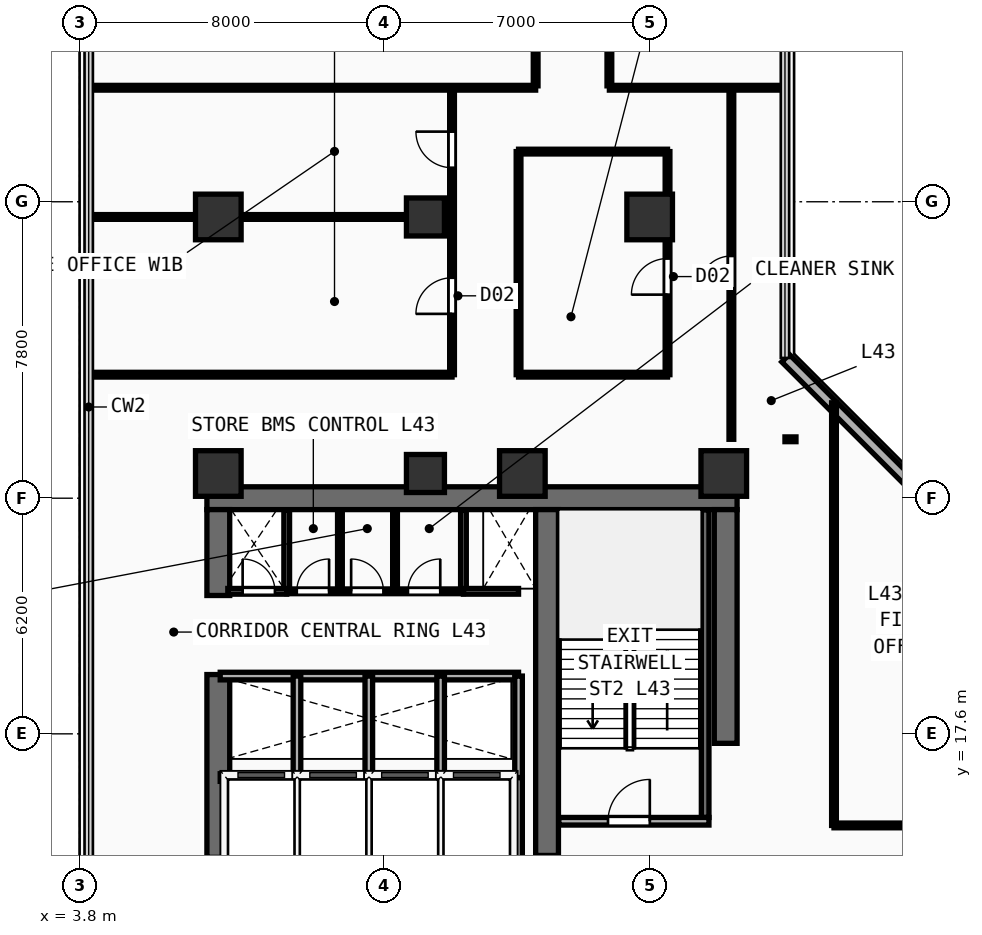
"""IFC4 building model, lengths in metres.
Left out: names, types, materials, properties, quantities, classifications, styles, units other than length and angle.
Written with IfcOpenShell. Run it as: python <this file> out.ifc"""

import sys

from ifc_helpers import new_model, si_unit, direction, frame, frame_2d, origin, origin_2d, place, context, subcontext, project, spatial, rectangle, extrude, element, fill, save


model = new_model("IFC4")
c1 = context("Model", 3, precision=1e-05, world=origin(), true_north=direction((0.0, 1.0)))
c2 = subcontext(c1, "Body", "Model", "MODEL_VIEW")
j1 = project(units=[si_unit("LENGTHUNIT", "METRE"), si_unit("PLANEANGLEUNIT", "RADIAN")], contexts=[c1])
p1 = place(None, origin())
s1 = spatial("IfcSite", under=j1, at=p1, CompositionType="ELEMENT")
p2 = place(p1, origin())
s2 = spatial("IfcBuilding", under=s1, at=p2, CompositionType="ELEMENT")
p3 = place(p2, frame((0.0, 0.0, 169.0)))
s3 = spatial("IfcBuildingStorey", under=s2, at=p3, CompositionType="ELEMENT", Elevation=169.0)
p4 = place(p3, frame((7.15, 23.8, 0.0), z_axis=(0.0, 0.0, 1.0), x_axis=(1.0, 0.0, 0.0)))
e1 = element("IfcWall", 1, at=p4, inside=s3, PredefinedType="SHEAR", context=c2, shape_type="SweptSolid", body=[
    extrude(rectangle(XDim=13.95, YDim=0.6, at=frame_2d((6.975, 0.0))), origin(), (0.0, 0.0, 1.0), 3.56),
])
p5 = place(p3, frame((7.45, 14.35, 0.0), z_axis=(0.0, 0.0, 1.0), x_axis=(0.0, 1.0, 0.0)))
e2 = element("IfcWall", 2, at=p5, inside=s3, PredefinedType="SHEAR", context=c2, shape_type="SweptSolid", body=[
    extrude(rectangle(XDim=4.81, YDim=0.6, at=frame_2d((2.405, 0.0))), origin(), (0.0, 0.0, 1.0), 3.56),
])
p6 = place(p3, frame((7.45, 21.24, 0.0), z_axis=(0.0, 0.0, 1.0), x_axis=(0.0, 1.0, 0.0)))
e3 = element("IfcWall", 3, at=p6, inside=s3, PredefinedType="SHEAR", context=c2, shape_type="SweptSolid", body=[
    extrude(rectangle(XDim=2.26, YDim=0.6, at=frame_2d((1.13, 0.0))), origin(), (0.0, 0.0, 1.0), 3.56),
])
p7 = place(p3, frame((20.8, 17.35, 0.0), z_axis=(0.0, 0.0, 1.0), x_axis=(0.0, 1.0, 0.0)))
e4 = element("IfcWall", 4, at=p7, inside=s3, PredefinedType="SHEAR", context=c2, shape_type="SweptSolid", body=[
    extrude(rectangle(XDim=6.15, YDim=0.6, at=frame_2d((3.075, 0.0))), origin(), (0.0, 0.0, 1.0), 3.56),
])
p8 = place(p3, frame((16.1, 14.4, 0.0), z_axis=(0.0, 0.0, 1.0), x_axis=(0.0, 1.0, 0.0)))
e5 = element("IfcWall", 5, at=p8, inside=s3, PredefinedType="SHEAR", context=c2, shape_type="SweptSolid", body=[
    extrude(rectangle(XDim=9.1, YDim=0.6, at=frame_2d((4.55, 0.0))), origin(), (0.0, 0.0, 1.0), 3.56),
])
for number, where, z_axis, x_axis in (
    (6, (7.45, 24.45, 0.0), (0.0, 0.0, 1.0), (1.0, 0.0, 0.0)),
    (7, (15.45, 24.45, 0.0), (0.0, 0.0, 1.0), (1.0, 0.0, 0.0)),
    (8, (20.75, 24.45, 0.0), (0.0, 0.0, 1.0), (1.0, 0.0, 0.0)),
    (9, (7.45, 31.2, 0.0), (0.0, 0.0, 1.0), (1.0, 0.0, 0.0)),
    (10, (18.8, 31.2, 0.0), (0.0, 0.0, 1.0), (1.0, 0.0, 0.0)),
):
    element("IfcColumn", number, at=place(p3, frame(where, z_axis=z_axis, x_axis=x_axis)), inside=s3, PredefinedType="COLUMN", context=c2, shape_type="SweptSolid", body=[
        extrude(rectangle(XDim=1.2, YDim=1.2, at=origin_2d()), origin(), (0.0, 0.0, 1.0), 3.56),
    ])
for number, where, z_axis, x_axis in (
    (11, (12.9, 24.45, 0.0), (0.0, 0.0, 1.0), (1.0, 0.0, 0.0)),
    (12, (12.9, 31.2, 0.0), (0.0, 0.0, 1.0), (1.0, 0.0, 0.0)),
):
    element("IfcColumn", number, at=place(p3, frame(where, z_axis=z_axis, x_axis=x_axis)), inside=s3, PredefinedType="COLUMN", context=c2, shape_type="SweptSolid", body=[
        extrude(rectangle(XDim=1.0, YDim=1.0, at=origin_2d()), origin(), (0.0, 0.0, 1.0), 3.56),
    ])
p9 = place(p3, frame((28.885, 20.975, 0.0), z_axis=(0.0, 0.0, 1.0), x_axis=(-0.707106781187, 0.707106781187, 0.0)))
e13 = element("IfcWall", 13, at=p9, inside=s3, PredefinedType="SOLIDWALL", context=c2, shape_type="SweptSolid", body=[
    extrude(rectangle(XDim=9.207, YDim=0.28, at=frame_2d((4.603, 0.0))), origin(), (0.0, 0.0, 1.0), 3.56),
])
p10 = place(p3, frame((20.26, 15.4, 0.0), z_axis=(0.0, 0.0, 1.0), x_axis=(0.0, 1.0, 0.0)))
e14 = element("IfcWall", 14, at=p10, inside=s3, PredefinedType="SHEAR", context=c2, shape_type="SweptSolid", body=[
    extrude(rectangle(XDim=8.09, YDim=0.2, at=frame_2d((4.045, 0.0))), origin(), (0.0, 0.0, 1.0), 3.56),
])
p11 = place(p3, frame((16.41, 15.3, 0.0), z_axis=(0.0, 0.0, 1.0), x_axis=(1.0, 0.0, 0.0)))
e15 = element("IfcWall", 15, at=p11, inside=s3, PredefinedType="PARTITIONING", context=c2, shape_type="SweptSolid", body=[
    extrude(rectangle(XDim=3.95, YDim=0.2, at=frame_2d((1.975, 0.0))), origin(), (0.0, 0.0, 1.0), 3.56),
])
p12 = place(p11, frame((1.294, 0.0, 0.0)))
e16 = element("IfcOpeningElement", 16, at=p12, cuts=e15, PredefinedType="OPENING", context=c2, shape_type="SweptSolid", body=[
    extrude(rectangle(XDim=1.1, YDim=2.2, at=frame_2d((0.55, 1.1))), frame((0.0, 0.11, 0.0), z_axis=(0.0, -1.0, 0.0), x_axis=(1.0, 0.0, 0.0)), (0.0, 0.0, 1.0), 0.22),
])
p13 = place(p3, frame((7.5, 16.45, 0.0), z_axis=(0.0, 0.0, 1.0), x_axis=(1.0, 0.0, 0.0)))
e17 = element("IfcWall", 17, at=p13, inside=s3, PredefinedType="PARTITIONING", context=c2, shape_type="SweptSolid", body=[
    extrude(rectangle(XDim=7.85, YDim=0.2, at=frame_2d((3.925, 0.0))), origin(), (0.0, 0.0, 1.0), 3.56),
])
for number, where, z_axis, x_axis in (
    (18, (15.35, 14.22, 0.0), (0.0, 0.0, 1.0), (0.0, 1.0, 0.0)),
    (19, (9.52, 14.22, 0.0), (0.0, 0.0, 1.0), (0.0, 1.0, 0.0)),
    (20, (11.41, 14.22, 0.0), (0.0, 0.0, 1.0), (0.0, 1.0, 0.0)),
    (21, (13.3, 14.22, 0.0), (0.0, 0.0, 1.0), (0.0, 1.0, 0.0)),
):
    element("IfcWall", number, at=place(p3, frame(where, z_axis=z_axis, x_axis=x_axis)), inside=s3, PredefinedType="PARTITIONING", context=c2, shape_type="SweptSolid", body=[
        extrude(rectangle(XDim=2.23, YDim=0.2, at=frame_2d((1.115, 0.0))), origin(), (0.0, 0.0, 1.0), 3.56),
    ])
p14 = place(p3, frame((7.5, 19.12, 0.0), z_axis=(0.0, 0.0, 1.0), x_axis=(1.0, 0.0, 0.0)))
e22 = element("IfcWall", 22, at=p14, inside=s3, PredefinedType="PARTITIONING", context=c2, shape_type="SweptSolid", body=[
    extrude(rectangle(XDim=7.85, YDim=0.2, at=frame_2d((3.925, 0.0))), origin(), (0.0, 0.0, 1.0), 3.56),
])
for number, where, z_axis, x_axis in (
    (23, (15.35, 16.45, 0.0), (0.0, 0.0, 1.0), (0.0, 1.0, 0.0)),
    (24, (9.52, 16.45, 0.0), (0.0, 0.0, 1.0), (0.0, 1.0, 0.0)),
    (25, (11.41, 16.45, 0.0), (0.0, 0.0, 1.0), (0.0, 1.0, 0.0)),
    (26, (13.3, 16.45, 0.0), (0.0, 0.0, 1.0), (0.0, 1.0, 0.0)),
):
    element("IfcWall", number, at=place(p3, frame(where, z_axis=z_axis, x_axis=x_axis)), inside=s3, PredefinedType="PARTITIONING", context=c2, shape_type="SweptSolid", body=[
        extrude(rectangle(XDim=2.67, YDim=0.2, at=frame_2d((1.335, 0.0))), origin(), (0.0, 0.0, 1.0), 3.56),
    ])
for number, where, z_axis, x_axis in (
    (27, (9.25, 21.35, 0.0), (0.0, 0.0, 1.0), (0.0, 1.0, 0.0)),
    (28, (13.9, 21.35, 0.0), (0.0, 0.0, 1.0), (0.0, 1.0, 0.0)),
):
    element("IfcWall", number, at=place(p3, frame(where, z_axis=z_axis, x_axis=x_axis)), inside=s3, PredefinedType="PARTITIONING", context=c2, shape_type="SweptSolid", body=[
        extrude(rectangle(XDim=2.13, YDim=0.15, at=frame_2d((1.065, 0.0))), origin(), (0.0, 0.0, 1.0), 3.56),
    ])
p15 = place(p3, frame((7.7, 21.35, 0.0), z_axis=(0.0, 0.0, 1.0), x_axis=(1.0, 0.0, 0.0)))
e29 = element("IfcWall", 29, at=p15, inside=s3, PredefinedType="PARTITIONING", context=c2, shape_type="SweptSolid", body=[
    extrude(rectangle(XDim=1.55, YDim=0.15, at=frame_2d((0.775, 0.0))), origin(), (0.0, 0.0, 1.0), 3.56),
])
p16 = place(p15, frame((0.39, 0.0, 0.0)))
e30 = element("IfcOpeningElement", 30, at=p16, cuts=e29, PredefinedType="OPENING", context=c2, shape_type="SweptSolid", body=[
    extrude(rectangle(XDim=0.85, YDim=2.15, at=frame_2d((0.425, 1.075))), frame((0.0, 0.085, 0.0), z_axis=(0.0, -1.0, 0.0), x_axis=(1.0, 0.0, 0.0)), (0.0, 0.0, 1.0), 0.17),
])
p17 = place(p3, frame((13.9, 21.35, 0.0), z_axis=(0.0, 0.0, 1.0), x_axis=(1.0, 0.0, 0.0)))
e31 = element("IfcWall", 31, at=p17, inside=s3, PredefinedType="PARTITIONING", context=c2, shape_type="SweptSolid", body=[
    extrude(rectangle(XDim=1.45, YDim=0.15, at=frame_2d((0.725, 0.0))), origin(), (0.0, 0.0, 1.0), 3.56),
])
p18 = place(p3, frame((9.25, 21.35, 0.0), z_axis=(0.0, 0.0, 1.0), x_axis=(1.0, 0.0, 0.0)))
e32 = element("IfcWall", 32, at=p18, inside=s3, PredefinedType="PARTITIONING", context=c2, shape_type="SweptSolid", body=[
    extrude(rectangle(XDim=4.65, YDim=0.125, at=frame_2d((2.325, 0.0))), origin(), (0.0, 0.0, 1.0), 3.56),
])
p19 = place(p18, frame((0.265, 0.0, 0.0)))
e33 = element("IfcOpeningElement", 33, at=p19, cuts=e32, PredefinedType="OPENING", context=c2, shape_type="SweptSolid", body=[
    extrude(rectangle(XDim=0.85, YDim=2.15, at=frame_2d((0.425, 1.075))), frame((0.0, 0.073, 0.0), z_axis=(0.0, -1.0, 0.0), x_axis=(1.0, 0.0, 0.0)), (0.0, 0.0, 1.0), 0.145),
])
p20 = place(p18, frame((1.695, 0.0, 0.0)))
e34 = element("IfcOpeningElement", 34, at=p20, cuts=e32, PredefinedType="OPENING", context=c2, shape_type="SweptSolid", body=[
    extrude(rectangle(XDim=0.85, YDim=2.15, at=frame_2d((0.425, 1.075))), frame((0.0, 0.073, 0.0), z_axis=(0.0, -1.0, 0.0), x_axis=(1.0, 0.0, 0.0)), (0.0, 0.0, 1.0), 0.145),
])
p21 = place(p18, frame((3.19, 0.0, 0.0)))
e35 = element("IfcOpeningElement", 35, at=p21, cuts=e32, PredefinedType="OPENING", context=c2, shape_type="SweptSolid", body=[
    extrude(rectangle(XDim=0.85, YDim=2.15, at=frame_2d((0.425, 1.075))), frame((0.0, 0.073, 0.0), z_axis=(0.0, -1.0, 0.0), x_axis=(1.0, 0.0, 0.0)), (0.0, 0.0, 1.0), 0.145),
])
for number, where, z_axis, x_axis in (
    (36, (10.65, 21.35, 0.0), (0.0, 0.0, 1.0), (0.0, 1.0, 0.0)),
    (37, (12.1, 21.35, 0.0), (0.0, 0.0, 1.0), (0.0, 1.0, 0.0)),
):
    element("IfcWall", number, at=place(p3, frame(where, z_axis=z_axis, x_axis=x_axis)), inside=s3, PredefinedType="PARTITIONING", context=c2, shape_type="SweptSolid", body=[
        extrude(rectangle(XDim=2.1, YDim=0.125, at=frame_2d((1.05, 0.0))), origin(), (0.0, 0.0, 1.0), 3.56),
    ])
for number, where, z_axis, x_axis in (
    (38, (15.35, 27.05, 0.0), (0.0, 0.0, 1.0), (1.0, 0.0, 0.0)),
    (39, (15.35, 32.92, 0.0), (0.0, 0.0, 1.0), (1.0, 0.0, 0.0)),
):
    element("IfcWall", number, at=place(p3, frame(where, z_axis=z_axis, x_axis=x_axis)), inside=s3, PredefinedType="PARTITIONING", context=c2, shape_type="SweptSolid", body=[
        extrude(rectangle(XDim=3.92, YDim=0.125, at=frame_2d((1.96, 0.0))), origin(), (0.0, 0.0, 1.0), 3.56),
    ])
p22 = place(p3, frame((15.35, 27.05, 0.0), z_axis=(0.0, 0.0, 1.0), x_axis=(0.0, 1.0, 0.0)))
e40 = element("IfcWall", 40, at=p22, inside=s3, PredefinedType="PARTITIONING", context=c2, shape_type="SweptSolid", body=[
    extrude(rectangle(XDim=5.87, YDim=0.125, at=frame_2d((2.935, 0.0))), origin(), (0.0, 0.0, 1.0), 3.56),
])
p23 = place(p3, frame((19.27, 27.05, 0.0), z_axis=(0.0, 0.0, 1.0), x_axis=(0.0, 1.0, 0.0)))
e41 = element("IfcWall", 41, at=p23, inside=s3, PredefinedType="PARTITIONING", context=c2, shape_type="SweptSolid", body=[
    extrude(rectangle(XDim=5.87, YDim=0.125, at=frame_2d((2.935, 0.0))), origin(), (0.0, 0.0, 1.0), 3.56),
])
p24 = place(p23, frame((2.106, 0.0, 0.0)))
e42 = element("IfcOpeningElement", 42, at=p24, cuts=e41, PredefinedType="OPENING", context=c2, shape_type="SweptSolid", body=[
    extrude(rectangle(XDim=0.95, YDim=2.15, at=frame_2d((0.475, 1.075))), frame((0.0, 0.073, 0.0), z_axis=(0.0, -1.0, 0.0), x_axis=(1.0, 0.0, 0.0)), (0.0, 0.0, 1.0), 0.145),
])
p25 = place(p3, frame((13.6, 27.05, 0.0), z_axis=(0.0, 0.0, 1.0), x_axis=(0.0, 1.0, 0.0)))
e43 = element("IfcWall", 43, at=p25, inside=s3, PredefinedType="PARTITIONING", context=c2, shape_type="SweptSolid", body=[
    extrude(rectangle(XDim=7.55, YDim=0.125, at=frame_2d((3.775, 0.0))), origin(), (0.0, 0.0, 1.0), 3.56),
])
p26 = place(p25, frame((1.6, 0.0, 0.0)))
e44 = element("IfcOpeningElement", 44, at=p26, cuts=e43, PredefinedType="OPENING", context=c2, shape_type="SweptSolid", body=[
    extrude(rectangle(XDim=0.95, YDim=2.15, at=frame_2d((0.475, 1.075))), frame((0.0, 0.073, 0.0), z_axis=(0.0, -1.0, 0.0), x_axis=(1.0, 0.0, 0.0)), (0.0, 0.0, 1.0), 0.145),
])
p27 = place(p25, frame((5.446, 0.0, 0.0)))
e45 = element("IfcOpeningElement", 45, at=p27, cuts=e43, PredefinedType="OPENING", context=c2, shape_type="SweptSolid", body=[
    extrude(rectangle(XDim=0.95, YDim=2.15, at=frame_2d((0.475, 1.075))), frame((0.0, 0.073, 0.0), z_axis=(0.0, -1.0, 0.0), x_axis=(1.0, 0.0, 0.0)), (0.0, 0.0, 1.0), 0.145),
])
p28 = place(p3, frame((4.04, 27.05, 0.0), z_axis=(0.0, 0.0, 1.0), x_axis=(1.0, 0.0, 0.0)))
e46 = element("IfcWall", 46, at=p28, inside=s3, PredefinedType="PARTITIONING", context=c2, shape_type="SweptSolid", body=[
    extrude(rectangle(XDim=9.56, YDim=0.125, at=frame_2d((4.78, 0.0))), origin(), (0.0, 0.0, 1.0), 3.56),
])
p29 = place(p3, frame((4.04, 34.6, 0.0), z_axis=(0.0, 0.0, 1.0), x_axis=(1.0, 0.0, 0.0)))
e47 = element("IfcWall", 47, at=p29, inside=s3, PredefinedType="PARTITIONING", context=c2, shape_type="SweptSolid", body=[
    extrude(rectangle(XDim=11.76, YDim=0.125, at=frame_2d((5.88, 0.0))), origin(), (0.0, 0.0, 1.0), 3.56),
])
p30 = place(p3, frame((4.04, 31.2, 0.0), z_axis=(0.0, 0.0, 1.0), x_axis=(1.0, 0.0, 0.0)))
e48 = element("IfcWall", 48, at=p30, inside=s3, PredefinedType="PARTITIONING", context=c2, shape_type="SweptSolid", body=[
    extrude(rectangle(XDim=9.56, YDim=0.125, at=frame_2d((4.78, 0.0))), origin(), (0.0, 0.0, 1.0), 3.11),
])
p31 = place(p3, frame((20.95, 25.35, 0.0), z_axis=(0.0, 0.0, 1.0), x_axis=(0.0, 1.0, 0.0)))
e49 = element("IfcWall", 49, at=p31, inside=s3, PredefinedType="PARTITIONING", context=c2, shape_type="SweptSolid", body=[
    extrude(rectangle(XDim=9.25, YDim=0.125, at=frame_2d((4.625, 0.0))), origin(), (0.0, 0.0, 1.0), 3.56),
])
p32 = place(p31, frame((3.973, 0.0, 0.0)))
e50 = element("IfcOpeningElement", 50, at=p32, cuts=e49, PredefinedType="OPENING", context=c2, shape_type="SweptSolid", body=[
    extrude(rectangle(XDim=0.85, YDim=2.15, at=frame_2d((0.425, 1.075))), frame((0.0, 0.073, 0.0), z_axis=(0.0, -1.0, 0.0), x_axis=(1.0, 0.0, 0.0)), (0.0, 0.0, 1.0), 0.145),
])
p33 = place(p3, frame((22.65, 25.35, 0.0), z_axis=(0.0, 0.0, 1.0), x_axis=(-1.0, 0.0, 0.0)))
e51 = element("IfcWall", 51, at=p33, inside=s3, PredefinedType="PARTITIONING", context=c2, shape_type="SweptSolid", body=[
    extrude(rectangle(XDim=0.29, YDim=0.125, at=frame_2d((0.145, 0.0))), origin(), (0.0, 0.0, 1.0), 3.56),
])
p34 = place(p3, frame((17.74, 34.6, 0.0), z_axis=(0.0, 0.0, 1.0), x_axis=(1.0, 0.0, 0.0)))
e52 = element("IfcWall", 52, at=p34, inside=s3, PredefinedType="PARTITIONING", context=c2, shape_type="SweptSolid", body=[
    extrude(rectangle(XDim=4.62, YDim=0.125, at=frame_2d((2.31, 0.0))), origin(), (0.0, 0.0, 1.0), 3.56),
])
p35 = place(p3, frame((23.65, 15.19, 0.0), z_axis=(0.0, 0.0, 1.0), x_axis=(0.0, 1.0, 0.0)))
e53 = element("IfcWall", 53, at=p35, inside=s3, PredefinedType="PARTITIONING", context=c2, shape_type="SweptSolid", body=[
    extrude(rectangle(XDim=11.12, YDim=0.125, at=frame_2d((5.56, 0.0))), origin(), (0.0, 0.0, 1.0), 3.56),
])
p36 = place(p3, frame((23.65, 15.19, 0.0), z_axis=(0.0, 0.0, 1.0), x_axis=(1.0, 0.0, 0.0)))
e54 = element("IfcWall", 54, at=p36, inside=s3, PredefinedType="PARTITIONING", context=c2, shape_type="SweptSolid", body=[
    extrude(rectangle(XDim=20.6, YDim=0.125, at=frame_2d((10.3, 0.0))), origin(), (0.0, 0.0, 1.0), 3.56),
])
p37 = place(p36, frame((3.54, 0.0, 0.0)))
e55 = element("IfcOpeningElement", 55, at=p37, cuts=e54, PredefinedType="OPENING", context=c2, shape_type="SweptSolid", body=[
    extrude(rectangle(XDim=0.95, YDim=2.15, at=frame_2d((0.475, 1.075))), frame((0.0, 0.073, 0.0), z_axis=(0.0, -1.0, 0.0), x_axis=(1.0, 0.0, 0.0)), (0.0, 0.0, 1.0), 0.145),
])
p38 = place(p36, frame((13.91, 0.0, 0.0)))
e56 = element("IfcOpeningElement", 56, at=p38, cuts=e54, PredefinedType="OPENING", context=c2, shape_type="SweptSolid", body=[
    extrude(rectangle(XDim=0.95, YDim=2.15, at=frame_2d((0.475, 1.075))), frame((0.0, 0.073, 0.0), z_axis=(0.0, -1.0, 0.0), x_axis=(1.0, 0.0, 0.0)), (0.0, 0.0, 1.0), 0.145),
])
p39 = place(p3, frame((15.8, 34.65, 0.0), z_axis=(0.0, 0.0, 1.0), x_axis=(0.0, 1.0, 0.0)))
e57 = element("IfcWall", 57, at=p39, inside=s3, PredefinedType="PARTITIONING", context=c2, shape_type="SweptSolid", body=[
    extrude(rectangle(XDim=8.25, YDim=0.125, at=frame_2d((4.125, 0.0))), origin(), (0.0, 0.0, 1.0), 3.56),
])
p40 = place(p39, frame((3.65, 0.0, 0.0)))
e58 = element("IfcOpeningElement", 58, at=p40, cuts=e57, PredefinedType="OPENING", context=c2, shape_type="SweptSolid", body=[
    extrude(rectangle(XDim=0.95, YDim=2.15, at=frame_2d((0.475, 1.075))), frame((0.0, 0.073, 0.0), z_axis=(0.0, -1.0, 0.0), x_axis=(1.0, 0.0, 0.0)), (0.0, 0.0, 1.0), 0.145),
])
p41 = place(p3, frame((17.74, 34.65, 0.0), z_axis=(0.0, 0.0, 1.0), x_axis=(0.0, 1.0, 0.0)))
e59 = element("IfcWall", 59, at=p41, inside=s3, PredefinedType="PARTITIONING", context=c2, shape_type="SweptSolid", body=[
    extrude(rectangle(XDim=8.25, YDim=0.125, at=frame_2d((4.125, 0.0))), origin(), (0.0, 0.0, 1.0), 3.56),
])
p42 = place(p41, frame((4.215, 0.0, 0.0)))
e60 = element("IfcOpeningElement", 60, at=p42, cuts=e59, PredefinedType="OPENING", context=c2, shape_type="SweptSolid", body=[
    extrude(rectangle(XDim=0.95, YDim=2.15, at=frame_2d((0.475, 1.075))), frame((0.0, 0.073, 0.0), z_axis=(0.0, -1.0, 0.0), x_axis=(1.0, 0.0, 0.0)), (0.0, 0.0, 1.0), 0.145),
])
p43 = place(p12, origin())
e61 = element("IfcDoor", 61, at=p43, inside=s3, OperationType="SINGLE_SWING_RIGHT", PredefinedType="DOOR", context=c2, shape_type="SweptSolid", body=[
    extrude(rectangle(XDim=1.1, YDim=2.2, at=frame_2d((0.55, 1.1))), frame((0.0, 0.025, 0.0), z_axis=(0.0, -1.0, 0.0), x_axis=(1.0, 0.0, 0.0)), (0.0, 0.0, 1.0), 0.05),
])
fill(e16, e61)
p44 = place(p16, origin())
e62 = element("IfcDoor", 62, at=p44, inside=s3, OperationType="SINGLE_SWING_LEFT", PredefinedType="DOOR", context=c2, shape_type="SweptSolid", body=[
    extrude(rectangle(XDim=0.85, YDim=2.15, at=frame_2d((0.425, 1.075))), frame((0.0, 0.025, 0.0), z_axis=(0.0, -1.0, 0.0), x_axis=(1.0, 0.0, 0.0)), (0.0, 0.0, 1.0), 0.05),
])
fill(e30, e62)
p45 = place(p19, origin())
e63 = element("IfcDoor", 63, at=p45, inside=s3, OperationType="SINGLE_SWING_RIGHT", PredefinedType="DOOR", context=c2, shape_type="SweptSolid", body=[
    extrude(rectangle(XDim=0.85, YDim=2.15, at=frame_2d((0.425, 1.075))), frame((0.0, 0.025, 0.0), z_axis=(0.0, -1.0, 0.0), x_axis=(1.0, 0.0, 0.0)), (0.0, 0.0, 1.0), 0.05),
])
fill(e33, e63)
p46 = place(p20, origin())
e64 = element("IfcDoor", 64, at=p46, inside=s3, OperationType="SINGLE_SWING_LEFT", PredefinedType="DOOR", context=c2, shape_type="SweptSolid", body=[
    extrude(rectangle(XDim=0.85, YDim=2.15, at=frame_2d((0.425, 1.075))), frame((0.0, 0.025, 0.0), z_axis=(0.0, -1.0, 0.0), x_axis=(1.0, 0.0, 0.0)), (0.0, 0.0, 1.0), 0.05),
])
fill(e34, e64)
p47 = place(p21, origin())
e65 = element("IfcDoor", 65, at=p47, inside=s3, OperationType="SINGLE_SWING_RIGHT", PredefinedType="DOOR", context=c2, shape_type="SweptSolid", body=[
    extrude(rectangle(XDim=0.85, YDim=2.15, at=frame_2d((0.425, 1.075))), frame((0.0, 0.025, 0.0), z_axis=(0.0, -1.0, 0.0), x_axis=(1.0, 0.0, 0.0)), (0.0, 0.0, 1.0), 0.05),
])
fill(e35, e65)
p48 = place(p24, origin())
e66 = element("IfcDoor", 66, at=p48, inside=s3, OperationType="SINGLE_SWING_LEFT", PredefinedType="DOOR", context=c2, shape_type="SweptSolid", body=[
    extrude(rectangle(XDim=0.95, YDim=2.15, at=frame_2d((0.475, 1.075))), frame((0.0, 0.025, 0.0), z_axis=(0.0, -1.0, 0.0), x_axis=(1.0, 0.0, 0.0)), (0.0, 0.0, 1.0), 0.05),
])
fill(e42, e66)
p49 = place(p26, origin())
e67 = element("IfcDoor", 67, at=p49, inside=s3, OperationType="SINGLE_SWING_LEFT", PredefinedType="DOOR", context=c2, shape_type="SweptSolid", body=[
    extrude(rectangle(XDim=0.95, YDim=2.15, at=frame_2d((0.475, 1.075))), frame((0.0, 0.025, 0.0), z_axis=(0.0, -1.0, 0.0), x_axis=(1.0, 0.0, 0.0)), (0.0, 0.0, 1.0), 0.05),
])
fill(e44, e67)
p50 = place(p27, origin())
e68 = element("IfcDoor", 68, at=p50, inside=s3, OperationType="SINGLE_SWING_RIGHT", PredefinedType="DOOR", context=c2, shape_type="SweptSolid", body=[
    extrude(rectangle(XDim=0.95, YDim=2.15, at=frame_2d((0.475, 1.075))), frame((0.0, 0.025, 0.0), z_axis=(0.0, -1.0, 0.0), x_axis=(1.0, 0.0, 0.0)), (0.0, 0.0, 1.0), 0.05),
])
fill(e45, e68)
p51 = place(p32, origin())
e69 = element("IfcDoor", 69, at=p51, inside=s3, OperationType="SINGLE_SWING_LEFT", PredefinedType="DOOR", context=c2, shape_type="SweptSolid", body=[
    extrude(rectangle(XDim=0.85, YDim=2.15, at=frame_2d((0.425, 1.075))), frame((0.0, 0.025, 0.0), z_axis=(0.0, -1.0, 0.0), x_axis=(1.0, 0.0, 0.0)), (0.0, 0.0, 1.0), 0.05),
])
fill(e50, e69)
save(model, sys.argv[1])
